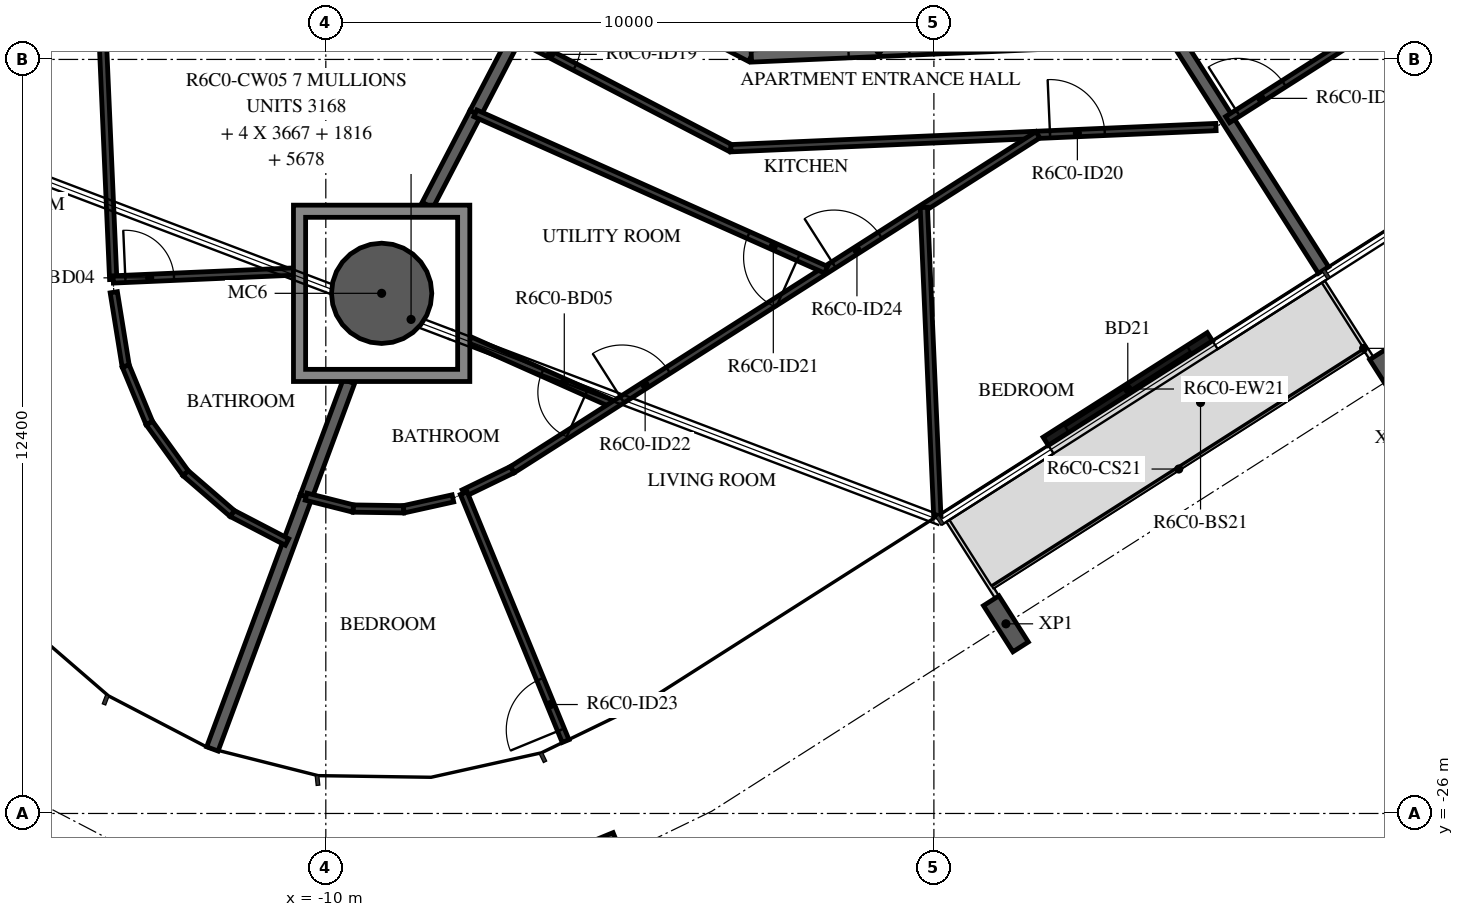
"""IFC4 building model, lengths in metres.
Left out: names, types, materials, properties, quantities, classifications, styles, units other than length and angle.
Written with IfcOpenShell. Run it as: python <this file> out.ifc"""

import sys

from ifc_helpers import new_model, si_unit, direction, frame, frame_2d, origin, origin_2d, place, context, subcontext, project, spatial, polyline, rectangle, hollow_circle, i_section, outline, extrude, element, fill, save


model = new_model("IFC4")
c1 = context("Model", 3, precision=1e-05, world=origin(), true_north=direction((0.0, 1.0)))
c2 = subcontext(c1, "Body", "Model", "MODEL_VIEW")
j1 = project(units=[si_unit("LENGTHUNIT", "METRE"), si_unit("PLANEANGLEUNIT", "RADIAN")], contexts=[c1])
p1 = place(None, origin())
s1 = spatial("IfcSite", under=j1, at=p1, CompositionType="ELEMENT")
p2 = place(p1, origin())
s2 = spatial("IfcBuilding", under=s1, at=p2, CompositionType="ELEMENT")
p3 = place(p2, frame((0.0, 0.0, 254.7)))
s3 = spatial("IfcBuildingStorey", under=s2, at=p3, CompositionType="ELEMENT", Elevation=254.7)
p4 = place(p3, frame((-9.082, -17.446, -0.38), z_axis=(0.0, 0.0, 1.0), x_axis=(1.0, 0.0, 0.0)))
e1 = element("IfcColumn", 1, at=p4, inside=s3, PredefinedType="COLUMN", context=c2, shape_type="SweptSolid", body=[
    extrude(hollow_circle(Radius=0.825, WallThickness=0.04, at=origin_2d()), origin(), (0.0, 0.0, 1.0), 2.616),
])
for number, where, z_axis, x_axis in (
    (2, (-5.243, -26.789, -0.38), (0.0, 0.0, 1.0), (-0.925, -0.38, 0.0)),
    (3, (1.185, -22.881, -0.38), (0.0, 0.0, 1.0), (-0.843, -0.537, 0.0)),
    (4, (7.535, -18.835, -0.38), (0.0, 0.0, 1.0), (-0.843, -0.537, 0.0)),
):
    element("IfcColumn", number, at=place(p3, frame(where, z_axis=z_axis, x_axis=x_axis)), inside=s3, PredefinedType="COLUMN", context=c2, shape_type="SweptSolid", body=[
        extrude(i_section(OverallWidth=0.3, OverallDepth=0.9, WebThickness=0.019, FlangeThickness=0.035, FilletRadius=0.03, at=origin_2d()), origin(), (0.0, 0.0, 1.0), 2.616),
    ])
p5 = place(p3, frame((1.839, -19.879, 0.0), z_axis=(0.0, 0.0, 1.0), x_axis=(0.843419508298, 0.53725555653, 0.0)))
e5 = element("IfcWall", 5, at=p5, inside=s3, PredefinedType="STANDARD", context=c2, shape_type="SweptSolid", body=[
    extrude(rectangle(XDim=3.2, YDim=0.16, at=frame_2d((1.6, 0.0))), origin(), (0.0, 0.0, 1.0), 3.05),
])
p6 = place(p5, frame((0.4, 0.0, 0.0)))
e6 = element("IfcOpeningElement", 6, at=p6, cuts=e5, PredefinedType="OPENING", context=c2, shape_type="SweptSolid", body=[
    extrude(rectangle(XDim=2.4, YDim=2.4, at=frame_2d((1.2, 1.2))), frame((0.0, 0.09, 0.0), z_axis=(0.0, -1.0, 0.0), x_axis=(1.0, 0.0, 0.0)), (0.0, 0.0, 1.0), 0.18),
])
p7 = place(p3, frame((-9.372, -10.228, 0.0), z_axis=(0.0, 0.0, 1.0), x_axis=(0.887005184532, -0.461759464021, 0.0)))
e7 = element("IfcWall", 7, at=p7, inside=s3, PredefinedType="STANDARD", context=c2, shape_type="SweptSolid", body=[
    extrude(rectangle(XDim=7.181, YDim=0.2, at=frame_2d((3.591, 0.0))), origin(), (0.0, 0.0, 1.0), 3.05),
])
p8 = place(p7, frame((2.391, 0.0, 0.0)))
e8 = element("IfcOpeningElement", 8, at=p8, cuts=e7, PredefinedType="OPENING", context=c2, shape_type="SweptSolid", body=[
    extrude(rectangle(XDim=1.0, YDim=2.1, at=frame_2d((0.5, 1.05))), frame((0.0, 0.11, 0.0), z_axis=(0.0, -1.0, 0.0), x_axis=(1.0, 0.0, 0.0)), (0.0, 0.0, 1.0), 0.22),
])
p9 = place(p3, frame((-3.003, -13.544, 0.0), z_axis=(0.0, 0.0, 1.0), x_axis=(0.999048221872, 0.043619380718, 0.0)))
e9 = element("IfcWall", 9, at=p9, inside=s3, PredefinedType="STANDARD", context=c2, shape_type="SweptSolid", body=[
    extrude(rectangle(XDim=6.979, YDim=0.2, at=frame_2d((3.49, 0.0))), origin(), (0.0, 0.0, 1.0), 3.05),
])
p10 = place(p9, frame((1.6, 0.0, 0.0)))
e10 = element("IfcOpeningElement", 10, at=p10, cuts=e9, PredefinedType="OPENING", context=c2, shape_type="SweptSolid", body=[
    extrude(rectangle(XDim=1.0, YDim=2.1, at=frame_2d((0.5, 1.05))), frame((0.0, 0.11, 0.0), z_axis=(0.0, -1.0, 0.0), x_axis=(1.0, 0.0, 0.0)), (0.0, 0.0, 1.0), 0.22),
])
p11 = place(p3, frame((-7.541, -14.486, 0.0), z_axis=(0.0, 0.0, 1.0), x_axis=(0.461746051786, 0.88701216658, 0.0)))
e11 = element("IfcWall", 11, at=p11, inside=s3, PredefinedType="STANDARD", context=c2, shape_type="SweptSolid", body=[
    extrude(rectangle(XDim=2.931, YDim=0.2, at=frame_2d((1.466, 0.0))), origin(), (0.0, 0.0, 1.0), 3.05),
])
p12 = place(p3, frame((-11.865, -24.939, 0.0), z_axis=(0.0, 0.0, 1.0), x_axis=(0.348214227297, 0.937414983829, 0.0)))
e12 = element("IfcWall", 12, at=p12, inside=s3, PredefinedType="STANDARD", context=c2, shape_type="SweptSolid", body=[
    extrude(rectangle(XDim=4.426, YDim=0.2, at=frame_2d((2.213, 0.0))), origin(), (0.0, 0.0, 1.0), 3.05),
])
p13 = place(p3, frame((-8.327, -15.996, 0.0), z_axis=(0.0, 0.0, 1.0), x_axis=(0.461722915657, 0.887024210017, 0.0)))
e13 = element("IfcWall", 13, at=p13, inside=s3, PredefinedType="STANDARD", context=c2, shape_type="SweptSolid", body=[
    extrude(rectangle(XDim=1.703, YDim=0.2, at=frame_2d((0.851, 0.0))), origin(), (0.0, 0.0, 1.0), 3.05),
])
p14 = place(p3, frame((-10.324, -20.79, 0.0), z_axis=(0.0, 0.0, 1.0), x_axis=(0.348313973933, 0.937377925686, 0.0)))
e14 = element("IfcWall", 14, at=p14, inside=s3, PredefinedType="STANDARD", context=c2, shape_type="SweptSolid", body=[
    extrude(rectangle(XDim=2.02, YDim=0.2, at=frame_2d((1.01, 0.0))), origin(), (0.0, 0.0, 1.0), 3.05),
])
p15 = place(p3, frame((6.407, -17.064, 0.0), z_axis=(0.0, 0.0, 1.0), x_axis=(-0.537324777979, 0.843375410461, 0.0)))
e15 = element("IfcWall", 15, at=p15, inside=s3, PredefinedType="STANDARD", context=c2, shape_type="SweptSolid", body=[
    extrude(rectangle(XDim=4.535, YDim=0.2, at=frame_2d((2.268, 0.0))), origin(), (0.0, 0.0, 1.0), 3.05),
])
p16 = place(p3, frame((-10.421, -11.373, 0.0), z_axis=(0.0, 0.0, 1.0), x_axis=(0.887012970857, -0.461744506769, 0.0)))
e16 = element("IfcWall", 16, at=p16, inside=s3, PredefinedType="PARTITIONING", context=c2, shape_type="SweptSolid", body=[
    extrude(rectangle(XDim=7.985, YDim=0.12, at=frame_2d((3.992, 0.0))), origin(), (0.0, 0.0, 1.0), 3.05),
])
p17 = place(p16, frame((4.192, 0.0, 0.0)))
e17 = element("IfcOpeningElement", 17, at=p17, cuts=e16, PredefinedType="OPENING", context=c2, shape_type="SweptSolid", body=[
    extrude(rectangle(XDim=0.9, YDim=2.1, at=frame_2d((0.45, 1.05))), frame((0.0, 0.07, 0.0), z_axis=(0.0, -1.0, 0.0), x_axis=(1.0, 0.0, 0.0)), (0.0, 0.0, 1.0), 0.14),
])
p18 = place(p3, frame((-13.496, -17.218, 0.0), z_axis=(0.0, 0.0, 1.0), x_axis=(-0.043640714674, 0.999047290183, 0.0)))
e18 = element("IfcWall", 18, at=p18, inside=s3, PredefinedType="PARTITIONING", context=c2, shape_type="SweptSolid", body=[
    extrude(rectangle(XDim=8.487, YDim=0.12, at=frame_2d((4.243, 0.0))), origin(), (0.0, 0.0, 1.0), 3.05),
])
p19 = place(p18, frame((4.608, 0.0, 0.0)))
e19 = element("IfcOpeningElement", 19, at=p19, cuts=e18, PredefinedType="OPENING", context=c2, shape_type="SweptSolid", body=[
    extrude(rectangle(XDim=0.9, YDim=2.1, at=frame_2d((0.45, 1.05))), frame((0.0, 0.07, 0.0), z_axis=(0.0, -1.0, 0.0), x_axis=(1.0, 0.0, 0.0)), (0.0, 0.0, 1.0), 0.14),
])
p20 = place(p3, frame((-17.215, -14.57, 0.0), z_axis=(0.0, 0.0, 1.0), x_axis=(0.520949659667, 0.853587401555, 0.0)))
e20 = element("IfcWall", 20, at=p20, inside=s3, PredefinedType="PARTITIONING", context=c2, shape_type="SweptSolid", body=[
    extrude(rectangle(XDim=6.455, YDim=0.12, at=frame_2d((3.228, 0.0))), origin(), (0.0, 0.0, 1.0), 3.05),
])
p21 = place(p20, frame((1.2, 0.0, 0.0)))
e21 = element("IfcOpeningElement", 21, at=p21, cuts=e20, PredefinedType="OPENING", context=c2, shape_type="SweptSolid", body=[
    extrude(rectangle(XDim=0.9, YDim=2.1, at=frame_2d((0.45, 1.05))), frame((0.0, 0.07, 0.0), z_axis=(0.0, -1.0, 0.0), x_axis=(1.0, 0.0, 0.0)), (0.0, 0.0, 1.0), 0.14),
])
for number, where, z_axis, x_axis in (
    (22, (-10.638, -21.536, 0.0), (0.0, 0.0, 1.0), (-0.887, 0.462, 0.0)),
    (23, (-11.539, -21.067, 0.0), (0.0, 0.0, 1.0), (-0.757, 0.654, 0.0)),
    (24, (-12.308, -20.402, 0.0), (0.0, 0.0, 1.0), (-0.585, 0.811, 0.0)),
):
    element("IfcWall", number, at=place(p3, frame(where, z_axis=z_axis, x_axis=x_axis)), inside=s3, PredefinedType="PARTITIONING", context=c2, shape_type="SweptSolid", body=[
        extrude(rectangle(XDim=1.016, YDim=0.12, at=frame_2d((0.508, 0.0))), origin(), (0.0, 0.0, 1.0), 3.05),
    ])
p22 = place(p3, frame((-12.903, -19.579, 0.0), z_axis=(0.0, 0.0, 1.0), x_axis=(-0.382754975976, 0.923849894932, 0.0)))
e25 = element("IfcWall", 25, at=p22, inside=s3, PredefinedType="PARTITIONING", context=c2, shape_type="SweptSolid", body=[
    extrude(rectangle(XDim=1.016, YDim=0.12, at=frame_2d((0.508, 0.0))), origin(), (0.0, 0.0, 1.0), 3.05),
])
p23 = place(p3, frame((-13.292, -18.64, 0.0), z_axis=(0.0, 0.0, 1.0), x_axis=(-0.159363796836, 0.98721992497, 0.0)))
e26 = element("IfcWall", 26, at=p23, inside=s3, PredefinedType="PARTITIONING", context=c2, shape_type="SweptSolid", body=[
    extrude(rectangle(XDim=1.227, YDim=0.12, at=frame_2d((0.614, 0.0))), origin(), (0.0, 0.0, 1.0), 3.05),
])
p24 = place(p3, frame((-13.496, -17.218, 0.0), z_axis=(0.0, 0.0, 1.0), x_axis=(0.999044946677, 0.043694330507, 0.0)))
e27 = element("IfcWall", 27, at=p24, inside=s3, PredefinedType="PARTITIONING", context=c2, shape_type="SweptSolid", body=[
    extrude(rectangle(XDim=2.967, YDim=0.12, at=frame_2d((1.483, 0.0))), origin(), (0.0, 0.0, 1.0), 3.05),
])
p25 = place(p24, frame((0.2, 0.0, 0.0)))
e28 = element("IfcOpeningElement", 28, at=p25, cuts=e27, PredefinedType="OPENING", context=c2, shape_type="SweptSolid", body=[
    extrude(rectangle(XDim=0.8, YDim=2.1, at=frame_2d((0.4, 1.05))), frame((0.0, 0.07, 0.0), z_axis=(0.0, -1.0, 0.0), x_axis=(1.0, 0.0, 0.0)), (0.0, 0.0, 1.0), 0.14),
])
p26 = place(p3, frame((-3.339, -15.06, 0.0), z_axis=(0.0, 0.0, 1.0), x_axis=(0.999047716945, 0.043630943905, 0.0)))
e29 = element("IfcWall", 29, at=p26, inside=s3, PredefinedType="PARTITIONING", context=c2, shape_type="SweptSolid", body=[
    extrude(rectangle(XDim=7.985, YDim=0.12, at=frame_2d((3.992, 0.0))), origin(), (0.0, 0.0, 1.0), 3.05),
])
p27 = place(p26, frame((5.253, 0.0, 0.0)))
e30 = element("IfcOpeningElement", 30, at=p27, cuts=e29, PredefinedType="OPENING", context=c2, shape_type="SweptSolid", body=[
    extrude(rectangle(XDim=0.9, YDim=2.1, at=frame_2d((0.45, 1.05))), frame((0.0, 0.07, 0.0), z_axis=(0.0, -1.0, 0.0), x_axis=(1.0, 0.0, 0.0)), (0.0, 0.0, 1.0), 0.14),
])
p28 = place(p3, frame((-10.324, -20.79, 0.0), z_axis=(0.0, 0.0, 1.0), x_axis=(0.969547579982, -0.244903021933, 0.0)))
e31 = element("IfcWall", 31, at=p28, inside=s3, PredefinedType="PARTITIONING", context=c2, shape_type="SweptSolid", body=[
    extrude(rectangle(XDim=0.801, YDim=0.12, at=frame_2d((0.4, 0.0))), origin(), (0.0, 0.0, 1.0), 3.05),
])
p29 = place(p3, frame((-9.548, -20.986, 0.0), z_axis=(0.0, 0.0, 1.0), x_axis=(0.999895921986, -0.014427237979, 0.0)))
e32 = element("IfcWall", 32, at=p29, inside=s3, PredefinedType="PARTITIONING", context=c2, shape_type="SweptSolid", body=[
    extrude(rectangle(XDim=0.829, YDim=0.12, at=frame_2d((0.415, 0.0))), origin(), (0.0, 0.0, 1.0), 3.05),
])
p30 = place(p3, frame((-8.719, -20.998, 0.0), z_axis=(0.0, 0.0, 1.0), x_axis=(0.976339323235, 0.216244134959, 0.0)))
e33 = element("IfcWall", 33, at=p30, inside=s3, PredefinedType="PARTITIONING", context=c2, shape_type="SweptSolid", body=[
    extrude(rectangle(XDim=0.829, YDim=0.12, at=frame_2d((0.414, 0.0))), origin(), (0.0, 0.0, 1.0), 3.05),
])
p31 = place(p3, frame((-5.256, -19.278, 0.0), z_axis=(0.0, 0.0, 1.0), x_axis=(-0.913284429849, 0.407322415532, 0.0)))
e34 = element("IfcWall", 34, at=p31, inside=s3, PredefinedType="PARTITIONING", context=c2, shape_type="SweptSolid", body=[
    extrude(rectangle(XDim=2.601, YDim=0.12, at=frame_2d((1.301, 0.0))), origin(), (0.0, 0.0, 1.0), 3.05),
])
p32 = place(p31, frame((0.5, 0.0, 0.0)))
e35 = element("IfcOpeningElement", 35, at=p32, cuts=e34, PredefinedType="OPENING", context=c2, shape_type="SweptSolid", body=[
    extrude(rectangle(XDim=0.8, YDim=2.1, at=frame_2d((0.4, 1.05))), frame((0.0, 0.07, 0.0), z_axis=(0.0, -1.0, 0.0), x_axis=(1.0, 0.0, 0.0)), (0.0, 0.0, 1.0), 0.14),
])
p33 = place(p3, frame((-7.732, -20.732, 0.0), z_axis=(0.0, 0.0, 1.0), x_axis=(0.900065466697, 0.435754696659, 0.0)))
e36 = element("IfcWall", 36, at=p33, inside=s3, PredefinedType="PARTITIONING", context=c2, shape_type="SweptSolid", body=[
    extrude(rectangle(XDim=0.889, YDim=0.12, at=frame_2d((0.445, 0.0))), origin(), (0.0, 0.0, 1.0), 3.05),
])
p34 = place(p3, frame((-6.932, -20.345, 0.0), z_axis=(0.0, 0.0, 1.0), x_axis=(0.843388627156, 0.537304032726, 0.0)))
e37 = element("IfcWall", 37, at=p34, inside=s3, PredefinedType="PARTITIONING", context=c2, shape_type="SweptSolid", body=[
    extrude(rectangle(XDim=10.246, YDim=0.12, at=frame_2d((5.123, 0.0))), origin(), (0.0, 0.0, 1.0), 3.05),
])
p35 = place(p34, frame((2.138, 0.0, 0.0)))
e38 = element("IfcOpeningElement", 38, at=p35, cuts=e37, PredefinedType="OPENING", context=c2, shape_type="SweptSolid", body=[
    extrude(rectangle(XDim=0.9, YDim=2.1, at=frame_2d((0.45, 1.05))), frame((0.0, 0.07, 0.0), z_axis=(0.0, -1.0, 0.0), x_axis=(1.0, 0.0, 0.0)), (0.0, 0.0, 1.0), 0.14),
])
p36 = place(p34, frame((6.268, 0.0, 0.0)))
e39 = element("IfcOpeningElement", 39, at=p36, cuts=e37, PredefinedType="OPENING", context=c2, shape_type="SweptSolid", body=[
    extrude(rectangle(XDim=0.9, YDim=2.1, at=frame_2d((0.45, 1.05))), frame((0.0, 0.07, 0.0), z_axis=(0.0, -1.0, 0.0), x_axis=(1.0, 0.0, 0.0)), (0.0, 0.0, 1.0), 0.14),
])
p37 = place(p3, frame((-6.057, -24.81, 0.0), z_axis=(0.0, 0.0, 1.0), x_axis=(-0.380044941584, 0.924968022354, 0.0)))
e40 = element("IfcWall", 40, at=p37, inside=s3, PredefinedType="PARTITIONING", context=c2, shape_type="SweptSolid", body=[
    extrude(rectangle(XDim=4.408, YDim=0.12, at=frame_2d((2.204, 0.0))), origin(), (0.0, 0.0, 1.0), 3.05),
])
p38 = place(p37, frame((0.2, 0.0, 0.0)))
e41 = element("IfcOpeningElement", 41, at=p38, cuts=e40, PredefinedType="OPENING", context=c2, shape_type="SweptSolid", body=[
    extrude(rectangle(XDim=0.9, YDim=2.1, at=frame_2d((0.45, 1.05))), frame((0.0, 0.07, 0.0), z_axis=(0.0, -1.0, 0.0), x_axis=(1.0, 0.0, 0.0)), (0.0, 0.0, 1.0), 0.14),
])
p39 = place(p3, frame((-1.773, -17.059, 0.0), z_axis=(0.0, 0.0, 1.0), x_axis=(-0.913279926902, 0.407332511736, 0.0)))
e42 = element("IfcWall", 42, at=p39, inside=s3, PredefinedType="PARTITIONING", context=c2, shape_type="SweptSolid", body=[
    extrude(rectangle(XDim=6.315, YDim=0.12, at=frame_2d((3.158, 0.0))), origin(), (0.0, 0.0, 1.0), 3.05),
])
p40 = place(p39, frame((0.5, 0.0, 0.0)))
e43 = element("IfcOpeningElement", 43, at=p40, cuts=e42, PredefinedType="OPENING", context=c2, shape_type="SweptSolid", body=[
    extrude(rectangle(XDim=0.9, YDim=2.1, at=frame_2d((0.45, 1.05))), frame((0.0, 0.07, 0.0), z_axis=(0.0, -1.0, 0.0), x_axis=(1.0, 0.0, 0.0)), (0.0, 0.0, 1.0), 0.14),
])
p41 = place(p3, frame((0.056, -21.11, 0.0), z_axis=(0.0, 0.0, 1.0), x_axis=(-0.043583193193, 0.999049801197, 0.0)))
e44 = element("IfcWall", 44, at=p41, inside=s3, PredefinedType="PARTITIONING", context=c2, shape_type="SweptSolid", body=[
    extrude(rectangle(XDim=5.081, YDim=0.12, at=frame_2d((2.541, 0.0))), origin(), (0.0, 0.0, 1.0), 3.05),
])
p42 = place(p3, frame((4.83, -14.59, 0.0), z_axis=(0.0, 0.0, 1.0), x_axis=(0.843393042763, 0.537297101629, 0.0)))
e45 = element("IfcWall", 45, at=p42, inside=s3, PredefinedType="PARTITIONING", context=c2, shape_type="SweptSolid", body=[
    extrude(rectangle(XDim=7.53, YDim=0.12, at=frame_2d((3.765, 0.0))), origin(), (0.0, 0.0, 1.0), 3.05),
])
p43 = place(p42, frame((0.2, 0.0, 0.0)))
e46 = element("IfcOpeningElement", 46, at=p43, cuts=e45, PredefinedType="OPENING", context=c2, shape_type="SweptSolid", body=[
    extrude(rectangle(XDim=0.9, YDim=2.1, at=frame_2d((0.45, 1.05))), frame((0.0, 0.07, 0.0), z_axis=(0.0, -1.0, 0.0), x_axis=(1.0, 0.0, 0.0)), (0.0, 0.0, 1.0), 0.14),
])
p44 = place(p3, origin())
e47 = element("IfcWall", 47, at=p44, inside=s3, PredefinedType="STANDARD", context=c2, shape_type="SweptSolid", body=[
    extrude(outline(polyline([(-7.632, -15.996), (-7.632, -18.896), (-10.532, -18.896), (-10.532, -15.996), (-7.632, -15.996)]), holes=[polyline([(-10.332, -18.696), (-7.832, -18.696), (-7.832, -16.196), (-10.332, -16.196), (-10.332, -18.696)])]), origin(), (0.0, 0.0, 1.0), 3.05),
])
p45 = place(p6, origin())
e48 = element("IfcDoor", 48, at=p45, inside=s3, OperationType="DOUBLE_DOOR_SLIDING", PredefinedType="DOOR", context=c2, shape_type="SweptSolid", body=[
    extrude(rectangle(XDim=2.4, YDim=2.4, at=frame_2d((1.2, 1.2))), frame((0.0, 0.025, 0.0), z_axis=(0.0, -1.0, 0.0), x_axis=(1.0, 0.0, 0.0)), (0.0, 0.0, 1.0), 0.05),
])
fill(e6, e48)
p46 = place(p25, origin())
e49 = element("IfcDoor", 49, at=p46, inside=s3, OperationType="SINGLE_SWING_RIGHT", PredefinedType="DOOR", context=c2, shape_type="SweptSolid", body=[
    extrude(rectangle(XDim=0.8, YDim=2.1, at=frame_2d((0.4, 1.05))), frame((0.0, 0.025, 0.0), z_axis=(0.0, -1.0, 0.0), x_axis=(1.0, 0.0, 0.0)), (0.0, 0.0, 1.0), 0.05),
])
fill(e28, e49)
p47 = place(p10, origin())
e50 = element("IfcDoor", 50, at=p47, inside=s3, OperationType="SINGLE_SWING_LEFT", PredefinedType="DOOR", context=c2, shape_type="SweptSolid", body=[
    extrude(rectangle(XDim=1.0, YDim=2.1, at=frame_2d((0.5, 1.05))), frame((0.0, 0.025, 0.0), z_axis=(0.0, -1.0, 0.0), x_axis=(1.0, 0.0, 0.0)), (0.0, 0.0, 1.0), 0.05),
])
fill(e10, e50)
p48 = place(p17, origin())
e51 = element("IfcDoor", 51, at=p48, inside=s3, OperationType="SINGLE_SWING_LEFT", PredefinedType="DOOR", context=c2, shape_type="SweptSolid", body=[
    extrude(rectangle(XDim=0.9, YDim=2.1, at=frame_2d((0.45, 1.05))), frame((0.0, 0.025, 0.0), z_axis=(0.0, -1.0, 0.0), x_axis=(1.0, 0.0, 0.0)), (0.0, 0.0, 1.0), 0.05),
])
fill(e17, e51)
p49 = place(p27, origin())
e52 = element("IfcDoor", 52, at=p49, inside=s3, OperationType="SINGLE_SWING_LEFT", PredefinedType="DOOR", context=c2, shape_type="SweptSolid", body=[
    extrude(rectangle(XDim=0.9, YDim=2.1, at=frame_2d((0.45, 1.05))), frame((0.0, 0.025, 0.0), z_axis=(0.0, -1.0, 0.0), x_axis=(1.0, 0.0, 0.0)), (0.0, 0.0, 1.0), 0.05),
])
fill(e30, e52)
p50 = place(p40, origin())
e53 = element("IfcDoor", 53, at=p50, inside=s3, OperationType="SINGLE_SWING_LEFT", PredefinedType="DOOR", context=c2, shape_type="SweptSolid", body=[
    extrude(rectangle(XDim=0.9, YDim=2.1, at=frame_2d((0.45, 1.05))), frame((0.0, 0.025, 0.0), z_axis=(0.0, -1.0, 0.0), x_axis=(1.0, 0.0, 0.0)), (0.0, 0.0, 1.0), 0.05),
])
fill(e43, e53)
p51 = place(p32, origin())
e54 = element("IfcDoor", 54, at=p51, inside=s3, OperationType="SINGLE_SWING_LEFT", PredefinedType="DOOR", context=c2, shape_type="SweptSolid", body=[
    extrude(rectangle(XDim=0.8, YDim=2.1, at=frame_2d((0.4, 1.05))), frame((0.0, 0.025, 0.0), z_axis=(0.0, -1.0, 0.0), x_axis=(1.0, 0.0, 0.0)), (0.0, 0.0, 1.0), 0.05),
])
fill(e35, e54)
p52 = place(p35, origin())
e55 = element("IfcDoor", 55, at=p52, inside=s3, OperationType="SINGLE_SWING_LEFT", PredefinedType="DOOR", context=c2, shape_type="SweptSolid", body=[
    extrude(rectangle(XDim=0.9, YDim=2.1, at=frame_2d((0.45, 1.05))), frame((0.0, 0.025, 0.0), z_axis=(0.0, -1.0, 0.0), x_axis=(1.0, 0.0, 0.0)), (0.0, 0.0, 1.0), 0.05),
])
fill(e38, e55)
p53 = place(p38, origin())
e56 = element("IfcDoor", 56, at=p53, inside=s3, OperationType="SINGLE_SWING_LEFT", PredefinedType="DOOR", context=c2, shape_type="SweptSolid", body=[
    extrude(rectangle(XDim=0.9, YDim=2.1, at=frame_2d((0.45, 1.05))), frame((0.0, 0.025, 0.0), z_axis=(0.0, -1.0, 0.0), x_axis=(1.0, 0.0, 0.0)), (0.0, 0.0, 1.0), 0.05),
])
fill(e41, e56)
p54 = place(p36, origin())
e57 = element("IfcDoor", 57, at=p54, inside=s3, OperationType="SINGLE_SWING_RIGHT", PredefinedType="DOOR", context=c2, shape_type="SweptSolid", body=[
    extrude(rectangle(XDim=0.9, YDim=2.1, at=frame_2d((0.45, 1.05))), frame((0.0, 0.025, 0.0), z_axis=(0.0, -1.0, 0.0), x_axis=(1.0, 0.0, 0.0)), (0.0, 0.0, 1.0), 0.05),
])
fill(e39, e57)
p55 = place(p43, origin())
e58 = element("IfcDoor", 58, at=p55, inside=s3, OperationType="SINGLE_SWING_LEFT", PredefinedType="DOOR", context=c2, shape_type="SweptSolid", body=[
    extrude(rectangle(XDim=0.9, YDim=2.1, at=frame_2d((0.45, 1.05))), frame((0.0, 0.025, 0.0), z_axis=(0.0, -1.0, 0.0), x_axis=(1.0, 0.0, 0.0)), (0.0, 0.0, 1.0), 0.05),
])
fill(e46, e58)
save(model, sys.argv[1])
